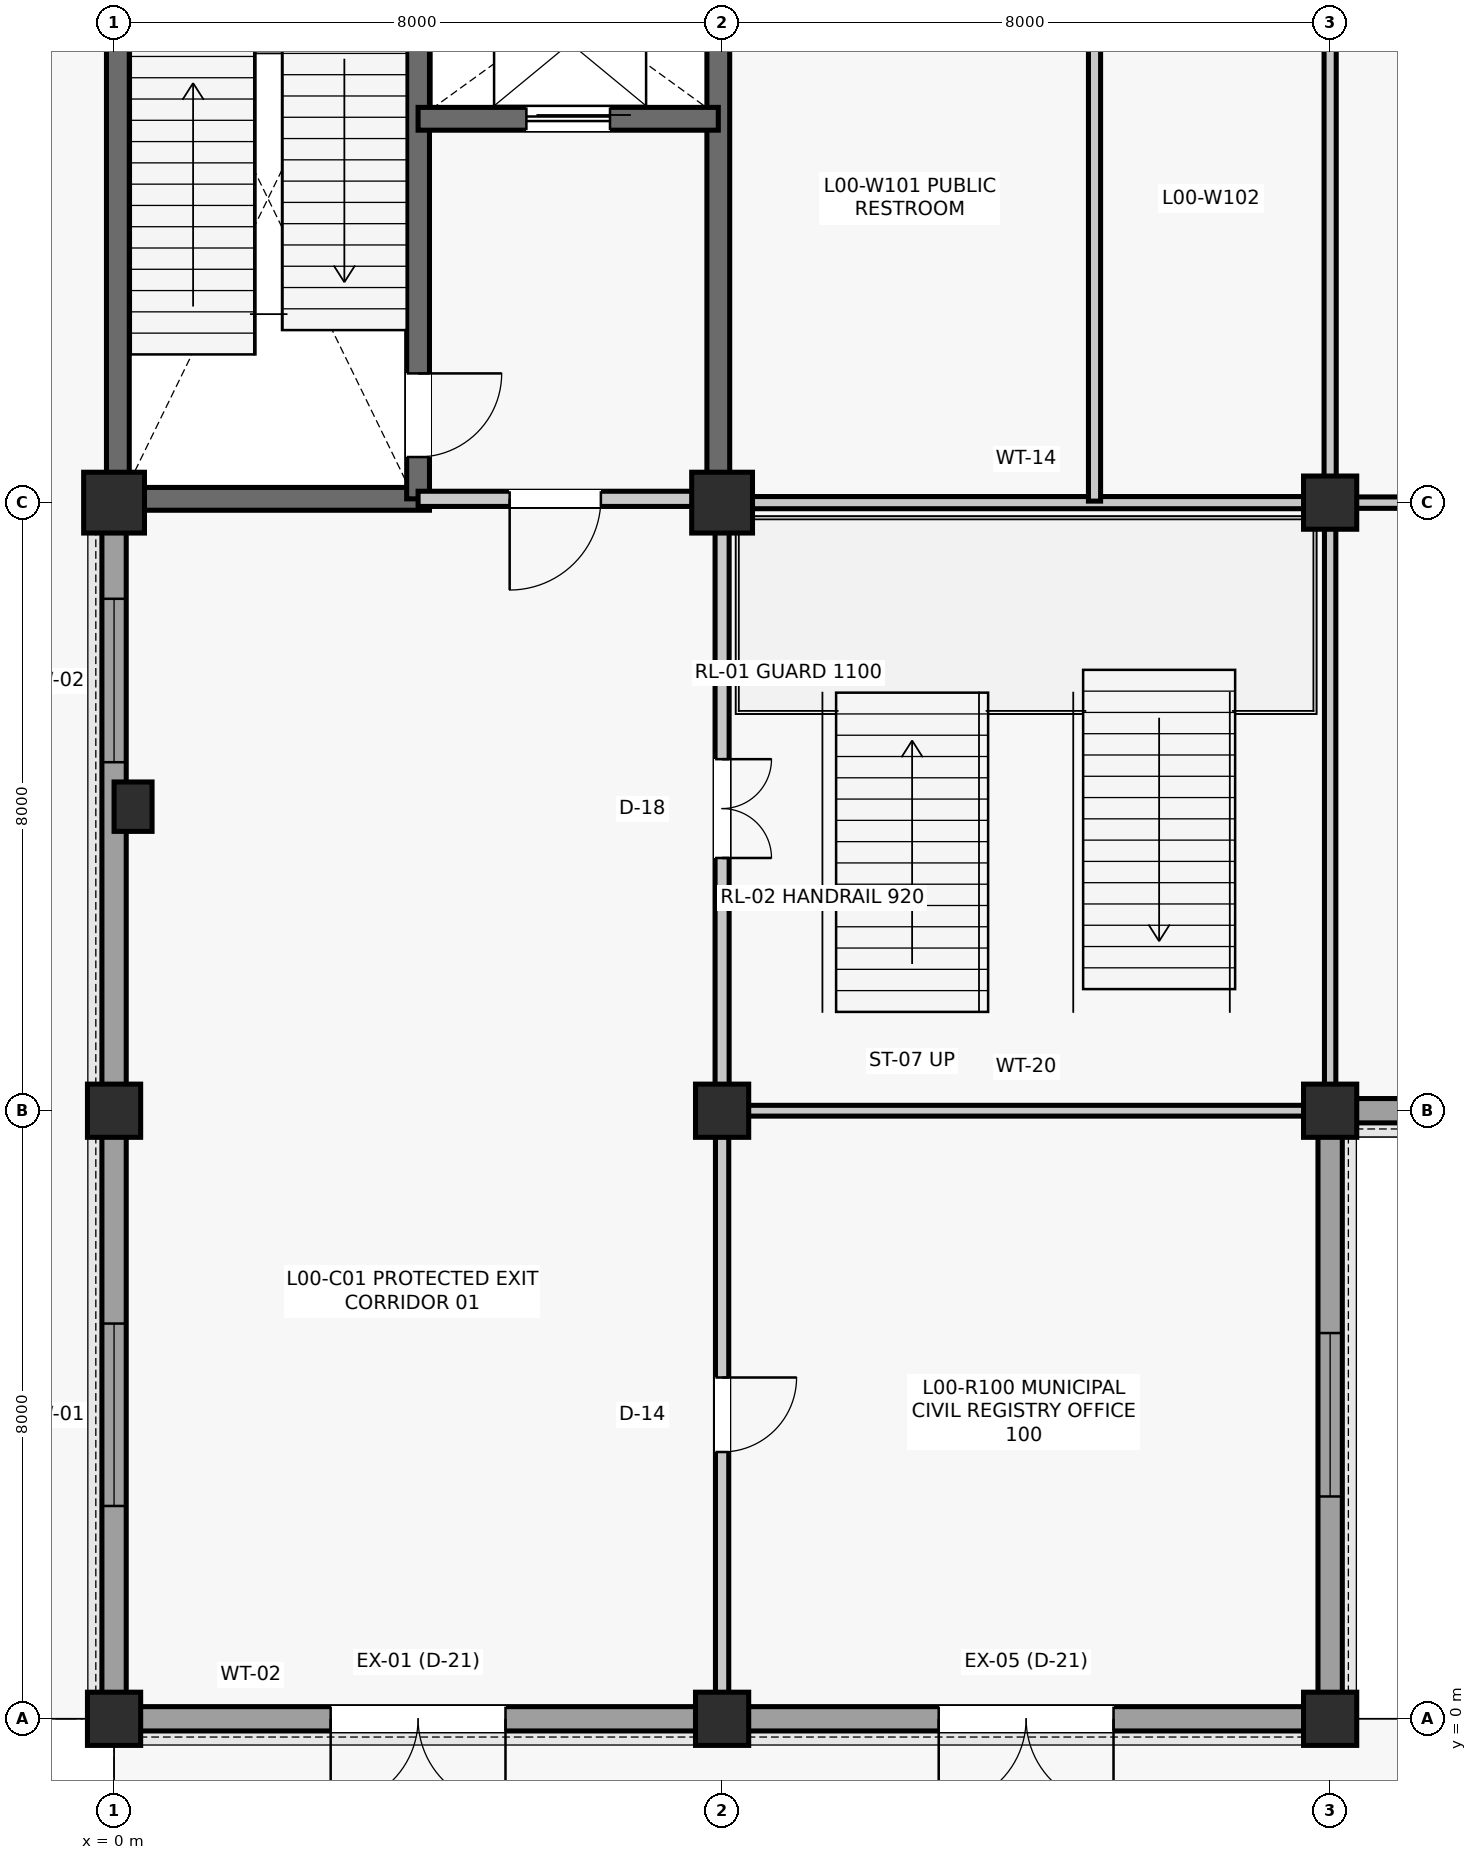
"""IFC4 building model, lengths in metres.
Left out: names, types, materials, properties, quantities, classifications, styles, units other than length and angle.
Written with IfcOpenShell. Run it as: python <this file> out.ifc"""

import sys

from ifc_helpers import new_model, si_unit, direction, frame, frame_2d, origin, origin_2d, place, context, subcontext, project, spatial, rectangle, extrude, element, fill, save


model = new_model("IFC4")
c1 = context("Model", 3, precision=1e-05, world=origin(), true_north=direction((0.0, 1.0)))
c2 = subcontext(c1, "Body", "Model", "MODEL_VIEW")
j1 = project(units=[si_unit("LENGTHUNIT", "METRE"), si_unit("PLANEANGLEUNIT", "RADIAN")], contexts=[c1])
p1 = place(None, origin())
s1 = spatial("IfcSite", under=j1, at=p1, CompositionType="ELEMENT")
p2 = place(p1, origin())
s2 = spatial("IfcBuilding", under=s1, at=p2, CompositionType="ELEMENT")
p3 = place(p2, origin())
s3 = spatial("IfcBuildingStorey", under=s2, at=p3, CompositionType="ELEMENT", Elevation=0.0)
for number, where, z_axis, x_axis in (
    (1, (0.0, 0.0, 0.0), (0.0, 0.0, 1.0), (1.0, 0.0, 0.0)),
    (2, (0.0, 8.0, 0.0), (0.0, 0.0, 1.0), (1.0, 0.0, 0.0)),
):
    element("IfcColumn", number, at=place(p3, frame(where, z_axis=z_axis, x_axis=x_axis)), inside=s3, PredefinedType="COLUMN", context=c2, shape_type="SweptSolid", body=[
        extrude(rectangle(XDim=0.7, YDim=0.7, at=origin_2d()), origin(), (0.0, 0.0, 1.0), 5.28),
    ])
p4 = place(p3, frame((0.0, 16.0, 0.0), z_axis=(0.0, 0.0, 1.0), x_axis=(1.0, 0.0, 0.0)))
e3 = element("IfcColumn", 3, at=p4, inside=s3, PredefinedType="COLUMN", context=c2, shape_type="SweptSolid", body=[
    extrude(rectangle(XDim=0.8, YDim=0.8, at=origin_2d()), origin(), (0.0, 0.0, 1.0), 5.28),
])
for number, where, z_axis, x_axis in (
    (4, (8.0, 0.0, 0.0), (0.0, 0.0, 1.0), (1.0, 0.0, 0.0)),
    (5, (8.0, 8.0, 0.0), (0.0, 0.0, 1.0), (1.0, 0.0, 0.0)),
):
    element("IfcColumn", number, at=place(p3, frame(where, z_axis=z_axis, x_axis=x_axis)), inside=s3, PredefinedType="COLUMN", context=c2, shape_type="SweptSolid", body=[
        extrude(rectangle(XDim=0.7, YDim=0.7, at=origin_2d()), origin(), (0.0, 0.0, 1.0), 5.28),
    ])
p5 = place(p3, frame((8.0, 16.0, 0.0), z_axis=(0.0, 0.0, 1.0), x_axis=(1.0, 0.0, 0.0)))
e6 = element("IfcColumn", 6, at=p5, inside=s3, PredefinedType="COLUMN", context=c2, shape_type="SweptSolid", body=[
    extrude(rectangle(XDim=0.8, YDim=0.8, at=origin_2d()), origin(), (0.0, 0.0, 1.0), 5.28),
])
for number, where, z_axis, x_axis in (
    (7, (16.0, 0.0, 0.0), (0.0, 0.0, 1.0), (1.0, 0.0, 0.0)),
    (8, (16.0, 8.0, 0.0), (0.0, 0.0, 1.0), (1.0, 0.0, 0.0)),
    (9, (16.0, 16.0, 0.0), (0.0, 0.0, 1.0), (1.0, 0.0, 0.0)),
):
    element("IfcColumn", number, at=place(p3, frame(where, z_axis=z_axis, x_axis=x_axis)), inside=s3, PredefinedType="COLUMN", context=c2, shape_type="SweptSolid", body=[
        extrude(rectangle(XDim=0.7, YDim=0.7, at=origin_2d()), origin(), (0.0, 0.0, 1.0), 5.28),
    ])
p6 = place(p3, frame((0.25, 12.0, 0.0), z_axis=(0.0, 0.0, 1.0), x_axis=(1.0, 0.0, 0.0)))
e10 = element("IfcColumn", 10, at=p6, inside=s3, PredefinedType="PILASTER", context=c2, shape_type="SweptSolid", body=[
    extrude(rectangle(XDim=0.5, YDim=0.65, at=origin_2d()), origin(), (0.0, 0.0, 1.0), 5.28),
])
p7 = place(p3, frame((0.335, 0.0, 0.0), z_axis=(0.0, 0.0, 1.0), x_axis=(1.0, 0.0, 0.0)))
e11 = element("IfcWall", 11, at=p7, inside=s3, PredefinedType="SOLIDWALL", context=c2, shape_type="SweptSolid", body=[
    extrude(rectangle(XDim=7.33, YDim=0.32, at=frame_2d((3.665, 0.0))), origin(), (0.0, 0.0, 1.0), 4.61),
])
p8 = place(p7, frame((2.515, 0.0, 0.0)))
e12 = element("IfcOpeningElement", 12, at=p8, cuts=e11, PredefinedType="OPENING", context=c2, shape_type="SweptSolid", body=[
    extrude(rectangle(XDim=2.3, YDim=2.55, at=frame_2d((1.15, 1.275))), frame((0.0, 0.17, 0.0), z_axis=(0.0, -1.0, 0.0), x_axis=(1.0, 0.0, 0.0)), (0.0, 0.0, 1.0), 0.34),
])
p9 = place(p3, frame((0.0, 0.335, 0.0), z_axis=(0.0, 0.0, 1.0), x_axis=(0.0, 1.0, 0.0)))
e13 = element("IfcWall", 13, at=p9, inside=s3, PredefinedType="SOLIDWALL", context=c2, shape_type="SweptSolid", body=[
    extrude(rectangle(XDim=7.33, YDim=0.32, at=frame_2d((3.665, 0.0))), origin(), (0.0, 0.0, 1.0), 4.61),
])
p10 = place(p9, frame((2.465, 0.0, 0.9)))
e14 = element("IfcOpeningElement", 14, at=p10, cuts=e13, PredefinedType="OPENING", context=c2, shape_type="SweptSolid", body=[
    extrude(rectangle(XDim=2.4, YDim=2.8, at=frame_2d((1.2, 1.4))), frame((0.0, 0.17, 0.0), z_axis=(0.0, -1.0, 0.0), x_axis=(1.0, 0.0, 0.0)), (0.0, 0.0, 1.0), 0.34),
])
p11 = place(p3, frame((0.0, 8.335, 0.0), z_axis=(0.0, 0.0, 1.0), x_axis=(0.0, 1.0, 0.0)))
e15 = element("IfcWall", 15, at=p11, inside=s3, PredefinedType="SOLIDWALL", context=c2, shape_type="SweptSolid", body=[
    extrude(rectangle(XDim=7.28, YDim=0.32, at=frame_2d((3.64, 0.0))), origin(), (0.0, 0.0, 1.0), 4.674),
])
p12 = place(p11, frame((4.25, 0.0, 0.9)))
e16 = element("IfcOpeningElement", 16, at=p12, cuts=e15, PredefinedType="OPENING", context=c2, shape_type="SweptSolid", body=[
    extrude(rectangle(XDim=2.15, YDim=2.8, at=frame_2d((1.075, 1.4))), frame((0.0, 0.17, 0.0), z_axis=(0.0, -1.0, 0.0), x_axis=(1.0, 0.0, 0.0)), (0.0, 0.0, 1.0), 0.34),
])
p13 = place(p3, frame((8.335, 0.0, 0.0), z_axis=(0.0, 0.0, 1.0), x_axis=(1.0, 0.0, 0.0)))
e17 = element("IfcWall", 17, at=p13, inside=s3, PredefinedType="SOLIDWALL", context=c2, shape_type="SweptSolid", body=[
    extrude(rectangle(XDim=7.33, YDim=0.32, at=frame_2d((3.665, 0.0))), origin(), (0.0, 0.0, 1.0), 4.674),
])
p14 = place(p13, frame((2.515, 0.0, 0.0)))
e18 = element("IfcOpeningElement", 18, at=p14, cuts=e17, PredefinedType="OPENING", context=c2, shape_type="SweptSolid", body=[
    extrude(rectangle(XDim=2.3, YDim=2.55, at=frame_2d((1.15, 1.275))), frame((0.0, 0.17, 0.0), z_axis=(0.0, -1.0, 0.0), x_axis=(1.0, 0.0, 0.0)), (0.0, 0.0, 1.0), 0.34),
])
p15 = place(p3, frame((16.0, 0.335, 0.0), z_axis=(0.0, 0.0, 1.0), x_axis=(0.0, 1.0, 0.0)))
e19 = element("IfcWall", 19, at=p15, inside=s3, PredefinedType="SOLIDWALL", context=c2, shape_type="SweptSolid", body=[
    extrude(rectangle(XDim=7.33, YDim=0.32, at=frame_2d((3.665, 0.0))), origin(), (0.0, 0.0, 1.0), 4.614),
])
p16 = place(p15, frame((2.59, 0.0, 0.9)))
e20 = element("IfcOpeningElement", 20, at=p16, cuts=e19, PredefinedType="OPENING", context=c2, shape_type="SweptSolid", body=[
    extrude(rectangle(XDim=2.15, YDim=2.8, at=frame_2d((1.075, 1.4))), frame((0.0, 0.17, 0.0), z_axis=(0.0, -1.0, 0.0), x_axis=(1.0, 0.0, 0.0)), (0.0, 0.0, 1.0), 0.34),
])
p17 = place(p3, frame((16.335, 8.0, 0.0), z_axis=(0.0, 0.0, 1.0), x_axis=(1.0, 0.0, 0.0)))
e21 = element("IfcWall", 21, at=p17, inside=s3, PredefinedType="SOLIDWALL", context=c2, shape_type="SweptSolid", body=[
    extrude(rectangle(XDim=7.33, YDim=0.32, at=frame_2d((3.665, 0.0))), origin(), (0.0, 0.0, 1.0), 4.677),
])
p18 = place(p17, frame((2.515, 0.0, 0.9)))
e22 = element("IfcOpeningElement", 22, at=p18, cuts=e21, PredefinedType="OPENING", context=c2, shape_type="SweptSolid", body=[
    extrude(rectangle(XDim=2.3, YDim=2.55, at=frame_2d((1.15, 1.275))), frame((0.0, 0.17, 0.0), z_axis=(0.0, -1.0, 0.0), x_axis=(1.0, 0.0, 0.0)), (0.0, 0.0, 1.0), 0.34),
])
for number, where, z_axis, x_axis in (
    (23, (0.05, 16.29, 0.0), (0.0, 0.0, 1.0), (0.0, 1.0, 0.0)),
    (24, (7.95, 16.29, 0.0), (0.0, 0.0, 1.0), (0.0, 1.0, 0.0)),
):
    element("IfcWall", number, at=place(p3, frame(where, z_axis=z_axis, x_axis=x_axis)), inside=s3, PredefinedType="SHEAR", context=c2, shape_type="SweptSolid", body=[
        extrude(rectangle(XDim=7.42, YDim=0.3, at=frame_2d((3.71, 0.0))), origin(), (0.0, 0.0, 1.0), 5.035),
    ])
p19 = place(p3, frame((0.29, 16.05, 0.0), z_axis=(0.0, 0.0, 1.0), x_axis=(1.0, 0.0, 0.0)))
e25 = element("IfcWall", 25, at=p19, inside=s3, PredefinedType="SHEAR", context=c2, shape_type="SweptSolid", body=[
    extrude(rectangle(XDim=3.86, YDim=0.3, at=frame_2d((1.93, 0.0))), origin(), (0.0, 0.0, 1.0), 5.035),
])
p20 = place(p3, frame((4.0, 16.05, 0.0), z_axis=(0.0, 0.0, 1.0), x_axis=(0.0, 1.0, 0.0)))
e26 = element("IfcWall", 26, at=p20, inside=s3, PredefinedType="SHEAR", context=c2, shape_type="SweptSolid", body=[
    extrude(rectangle(XDim=7.9, YDim=0.3, at=frame_2d((3.95, 0.0))), origin(), (0.0, 0.0, 1.0), 5.035),
])
p21 = place(p20, frame((0.55, 0.0, 0.0)))
e27 = element("IfcOpeningElement", 27, at=p21, cuts=e26, PredefinedType="OPENING", context=c2, shape_type="SweptSolid", body=[
    extrude(rectangle(XDim=1.1, YDim=2.15, at=frame_2d((0.55, 1.075))), frame((0.0, 0.16, 0.0), z_axis=(0.0, -1.0, 0.0), x_axis=(1.0, 0.0, 0.0)), (0.0, 0.0, 1.0), 0.32),
])
p22 = place(p3, frame((4.0, 21.05, 0.0), z_axis=(0.0, 0.0, 1.0), x_axis=(1.0, 0.0, 0.0)))
e28 = element("IfcWall", 28, at=p22, inside=s3, PredefinedType="SHEAR", context=c2, shape_type="SweptSolid", body=[
    extrude(rectangle(XDim=3.95, YDim=0.3, at=frame_2d((1.975, 0.0))), origin(), (0.0, 0.0, 1.0), 5.035),
])
p23 = place(p22, frame((1.425, 0.0, 0.0)))
e29 = element("IfcOpeningElement", 29, at=p23, cuts=e28, PredefinedType="OPENING", context=c2, shape_type="SweptSolid", body=[
    extrude(rectangle(XDim=1.1, YDim=2.2, at=frame_2d((0.55, 1.1))), frame((0.0, 0.16, 0.0), z_axis=(0.0, -1.0, 0.0), x_axis=(1.0, 0.0, 0.0)), (0.0, 0.0, 1.0), 0.32),
])
p24 = place(p3, frame((4.0, 16.05, 0.0), z_axis=(0.0, 0.0, 1.0), x_axis=(1.0, 0.0, 0.0)))
e30 = element("IfcWall", 30, at=p24, inside=s3, PredefinedType="PARTITIONING", context=c2, shape_type="SweptSolid", body=[
    extrude(rectangle(XDim=3.61, YDim=0.2, at=frame_2d((1.805, 0.0))), origin(), (0.0, 0.0, 1.0), 4.336),
])
p25 = place(p24, frame((1.205, 0.0, 0.0)))
e31 = element("IfcOpeningElement", 31, at=p25, cuts=e30, PredefinedType="OPENING", context=c2, shape_type="SweptSolid", body=[
    extrude(rectangle(XDim=1.2, YDim=2.15, at=frame_2d((0.6, 1.075))), frame((0.0, 0.11, 0.0), z_axis=(0.0, -1.0, 0.0), x_axis=(1.0, 0.0, 0.0)), (0.0, 0.0, 1.0), 0.22),
])
p26 = place(p3, frame((8.0, 0.34, 0.0), z_axis=(0.0, 0.0, 1.0), x_axis=(0.0, 1.0, 0.0)))
e32 = element("IfcWall", 32, at=p26, inside=s3, PredefinedType="PARTITIONING", context=c2, shape_type="SweptSolid", body=[
    extrude(rectangle(XDim=7.32, YDim=0.175, at=frame_2d((3.66, 0.0))), origin(), (0.0, 0.0, 1.0), 4.412),
])
p27 = place(p26, frame((3.17, 0.0, 0.0)))
e33 = element("IfcOpeningElement", 33, at=p27, cuts=e32, PredefinedType="OPENING", context=c2, shape_type="SweptSolid", body=[
    extrude(rectangle(XDim=0.98, YDim=2.15, at=frame_2d((0.49, 1.075))), frame((0.0, 0.097, 0.0), z_axis=(0.0, -1.0, 0.0), x_axis=(1.0, 0.0, 0.0)), (0.0, 0.0, 1.0), 0.195),
])
p28 = place(p3, frame((8.0, 8.34, 0.0), z_axis=(0.0, 0.0, 1.0), x_axis=(0.0, 1.0, 0.0)))
e34 = element("IfcWall", 34, at=p28, inside=s3, PredefinedType="PARTITIONING", context=c2, shape_type="SweptSolid", body=[
    extrude(rectangle(XDim=7.27, YDim=0.185, at=frame_2d((3.635, 0.0))), origin(), (0.0, 0.0, 1.0), 4.404),
])
p29 = place(p28, frame((2.985, 0.0, 0.0)))
e35 = element("IfcOpeningElement", 35, at=p29, cuts=e34, PredefinedType="OPENING", context=c2, shape_type="SweptSolid", body=[
    extrude(rectangle(XDim=1.3, YDim=2.2, at=frame_2d((0.65, 1.1))), frame((0.0, 0.103, 0.0), z_axis=(0.0, -1.0, 0.0), x_axis=(1.0, 0.0, 0.0)), (0.0, 0.0, 1.0), 0.205),
])
p30 = place(p3, frame((8.34, 8.0, 0.0), z_axis=(0.0, 0.0, 1.0), x_axis=(1.0, 0.0, 0.0)))
e36 = element("IfcWall", 36, at=p30, inside=s3, PredefinedType="PARTITIONING", context=c2, shape_type="SweptSolid", body=[
    extrude(rectangle(XDim=7.32, YDim=0.142, at=frame_2d((3.66, 0.0))), origin(), (0.0, 0.0, 1.0), 4.336),
])
p31 = place(p3, frame((16.0, 8.34, 0.0), z_axis=(0.0, 0.0, 1.0), x_axis=(0.0, 1.0, 0.0)))
e37 = element("IfcWall", 37, at=p31, inside=s3, PredefinedType="PARTITIONING", context=c2, shape_type="SweptSolid", body=[
    extrude(rectangle(XDim=7.32, YDim=0.15, at=frame_2d((3.66, 0.0))), origin(), (0.0, 0.0, 1.0), 4.471),
])
p32 = place(p3, frame((8.39, 16.0, 0.0), z_axis=(0.0, 0.0, 1.0), x_axis=(1.0, 0.0, 0.0)))
e38 = element("IfcWall", 38, at=p32, inside=s3, PredefinedType="PARTITIONING", context=c2, shape_type="SweptSolid", body=[
    extrude(rectangle(XDim=7.27, YDim=0.16, at=frame_2d((3.635, 0.0))), origin(), (0.0, 0.0, 1.0), 4.404),
])
p33 = place(p3, frame((16.0, 16.34, 0.0), z_axis=(0.0, 0.0, 1.0), x_axis=(0.0, 1.0, 0.0)))
e39 = element("IfcWall", 39, at=p33, inside=s3, PredefinedType="PARTITIONING", context=c2, shape_type="SweptSolid", body=[
    extrude(rectangle(XDim=7.32, YDim=0.16, at=frame_2d((3.66, 0.0))), origin(), (0.0, 0.0, 1.0), 4.603),
])
p34 = place(p3, frame((16.34, 16.0, 0.0), z_axis=(0.0, 0.0, 1.0), x_axis=(1.0, 0.0, 0.0)))
e40 = element("IfcWall", 40, at=p34, inside=s3, PredefinedType="PARTITIONING", context=c2, shape_type="SweptSolid", body=[
    extrude(rectangle(XDim=7.32, YDim=0.15, at=frame_2d((3.66, 0.0))), origin(), (0.0, 0.0, 1.0), 4.603),
])
p35 = place(p3, frame((12.9, 16.02, 0.0), z_axis=(0.0, 0.0, 1.0), x_axis=(0.0, 1.0, 0.0)))
e41 = element("IfcWall", 41, at=p35, inside=s3, PredefinedType="PARTITIONING", context=c2, shape_type="SweptSolid", body=[
    extrude(rectangle(XDim=7.96, YDim=0.16, at=frame_2d((3.98, 0.0))), origin(), (0.0, 0.0, 1.0), 4.327),
])
p36 = place(p8, frame((2.3, 0.0, 0.0), z_axis=(0.0, 0.0, 1.0), x_axis=(-1.0, 0.0, 0.0)))
e42 = element("IfcDoor", 42, at=p36, inside=s3, OperationType="DOUBLE_DOOR_SINGLE_SWING", PredefinedType="DOOR", context=c2, shape_type="SweptSolid", body=[
    extrude(rectangle(XDim=2.3, YDim=2.55, at=frame_2d((1.15, 1.275))), frame((0.0, 0.025, 0.0), z_axis=(0.0, -1.0, 0.0), x_axis=(1.0, 0.0, 0.0)), (0.0, 0.0, 1.0), 0.05),
])
fill(e12, e42)
p37 = place(p10, origin())
e43 = element("IfcWindow", 43, at=p37, inside=s3, PartitioningType="SINGLE_PANEL", PredefinedType="WINDOW", context=c2, shape_type="SweptSolid", body=[
    extrude(rectangle(XDim=2.4, YDim=2.8, at=frame_2d((1.2, 1.4))), frame((0.0, 0.03, 0.0), z_axis=(0.0, -1.0, 0.0), x_axis=(1.0, 0.0, 0.0)), (0.0, 0.0, 1.0), 0.06),
])
fill(e14, e43)
p38 = place(p12, origin())
e44 = element("IfcWindow", 44, at=p38, inside=s3, PartitioningType="SINGLE_PANEL", PredefinedType="WINDOW", context=c2, shape_type="SweptSolid", body=[
    extrude(rectangle(XDim=2.15, YDim=2.8, at=frame_2d((1.075, 1.4))), frame((0.0, 0.03, 0.0), z_axis=(0.0, -1.0, 0.0), x_axis=(1.0, 0.0, 0.0)), (0.0, 0.0, 1.0), 0.06),
])
fill(e16, e44)
p39 = place(p14, frame((2.3, 0.0, 0.0), z_axis=(0.0, 0.0, 1.0), x_axis=(-1.0, 0.0, 0.0)))
e45 = element("IfcDoor", 45, at=p39, inside=s3, OperationType="DOUBLE_DOOR_SINGLE_SWING", PredefinedType="DOOR", context=c2, shape_type="SweptSolid", body=[
    extrude(rectangle(XDim=2.3, YDim=2.55, at=frame_2d((1.15, 1.275))), frame((0.0, 0.025, 0.0), z_axis=(0.0, -1.0, 0.0), x_axis=(1.0, 0.0, 0.0)), (0.0, 0.0, 1.0), 0.05),
])
fill(e18, e45)
p40 = place(p16, origin())
e46 = element("IfcWindow", 46, at=p40, inside=s3, PartitioningType="SINGLE_PANEL", PredefinedType="WINDOW", context=c2, shape_type="SweptSolid", body=[
    extrude(rectangle(XDim=2.15, YDim=2.8, at=frame_2d((1.075, 1.4))), frame((0.0, 0.03, 0.0), z_axis=(0.0, -1.0, 0.0), x_axis=(1.0, 0.0, 0.0)), (0.0, 0.0, 1.0), 0.06),
])
fill(e20, e46)
p41 = place(p21, frame((1.1, 0.0, 0.0), z_axis=(0.0, 0.0, 1.0), x_axis=(-1.0, 0.0, 0.0)))
e47 = element("IfcDoor", 47, at=p41, inside=s3, OperationType="SINGLE_SWING_RIGHT", PredefinedType="DOOR", context=c2, shape_type="SweptSolid", body=[
    extrude(rectangle(XDim=1.1, YDim=2.15, at=frame_2d((0.55, 1.075))), frame((0.0, 0.025, 0.0), z_axis=(0.0, -1.0, 0.0), x_axis=(1.0, 0.0, 0.0)), (0.0, 0.0, 1.0), 0.05),
])
fill(e27, e47)
p42 = place(p23, origin())
e48 = element("IfcDoor", 48, at=p42, inside=s3, OperationType="SLIDING_TO_LEFT", PredefinedType="DOOR", context=c2, shape_type="SweptSolid", body=[
    extrude(rectangle(XDim=1.1, YDim=2.2, at=frame_2d((0.55, 1.1))), frame((0.0, 0.025, 0.0), z_axis=(0.0, -1.0, 0.0), x_axis=(1.0, 0.0, 0.0)), (0.0, 0.0, 1.0), 0.05),
])
fill(e29, e48)
p43 = place(p25, frame((1.2, 0.0, 0.0), z_axis=(0.0, 0.0, 1.0), x_axis=(-1.0, 0.0, 0.0)))
e49 = element("IfcDoor", 49, at=p43, inside=s3, OperationType="SINGLE_SWING_LEFT", PredefinedType="DOOR", context=c2, shape_type="SweptSolid", body=[
    extrude(rectangle(XDim=1.2, YDim=2.15, at=frame_2d((0.6, 1.075))), frame((0.0, 0.025, 0.0), z_axis=(0.0, -1.0, 0.0), x_axis=(1.0, 0.0, 0.0)), (0.0, 0.0, 1.0), 0.05),
])
fill(e31, e49)
p44 = place(p27, frame((0.98, 0.0, 0.0), z_axis=(0.0, 0.0, 1.0), x_axis=(-1.0, 0.0, 0.0)))
e50 = element("IfcDoor", 50, at=p44, inside=s3, OperationType="SINGLE_SWING_RIGHT", PredefinedType="DOOR", context=c2, shape_type="SweptSolid", body=[
    extrude(rectangle(XDim=0.98, YDim=2.15, at=frame_2d((0.49, 1.075))), frame((0.0, 0.025, 0.0), z_axis=(0.0, -1.0, 0.0), x_axis=(1.0, 0.0, 0.0)), (0.0, 0.0, 1.0), 0.05),
])
fill(e33, e50)
p45 = place(p29, frame((1.3, 0.0, 0.0), z_axis=(0.0, 0.0, 1.0), x_axis=(-1.0, 0.0, 0.0)))
e51 = element("IfcDoor", 51, at=p45, inside=s3, OperationType="DOUBLE_DOOR_SINGLE_SWING", PredefinedType="DOOR", context=c2, shape_type="SweptSolid", body=[
    extrude(rectangle(XDim=1.3, YDim=2.2, at=frame_2d((0.65, 1.1))), frame((0.0, 0.025, 0.0), z_axis=(0.0, -1.0, 0.0), x_axis=(1.0, 0.0, 0.0)), (0.0, 0.0, 1.0), 0.05),
])
fill(e35, e51)
save(model, sys.argv[1])
